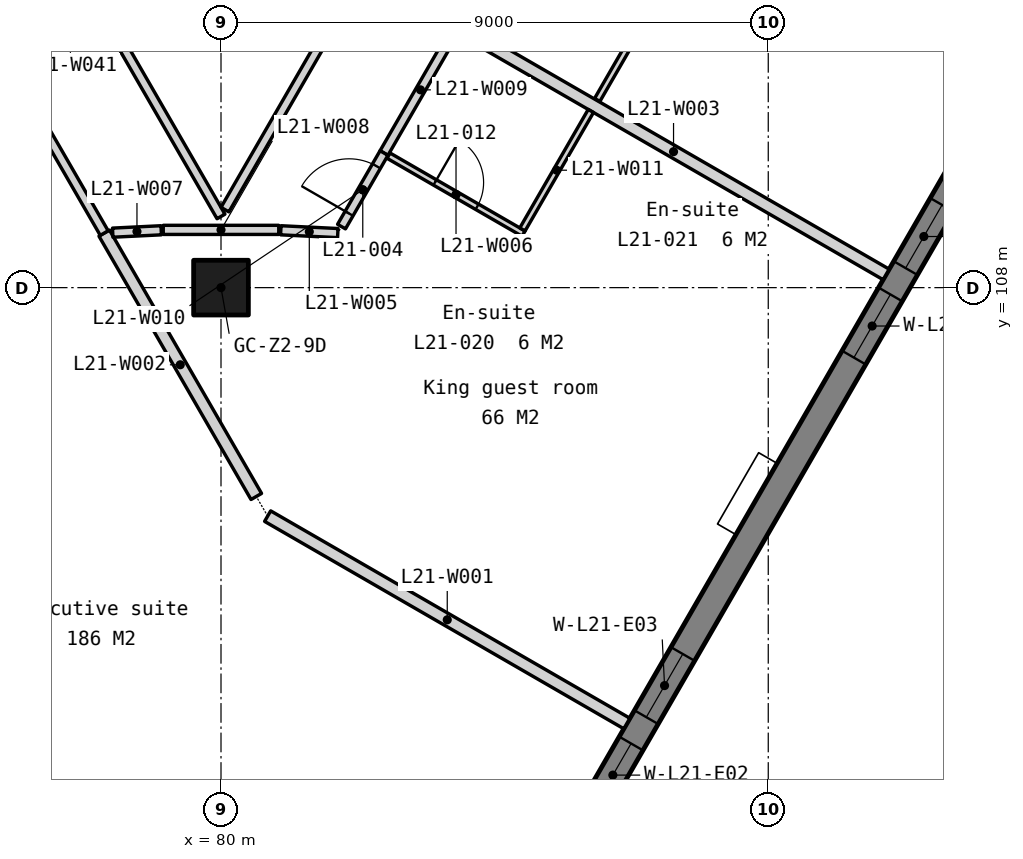
"""IFC4 building model, lengths in metres.
Left out: names, types, materials, properties, quantities, classifications, styles, units other than length and angle.
Written with IfcOpenShell. Run it as: python <this file> out.ifc"""

import sys

from ifc_helpers import new_model, si_unit, direction, frame, frame_2d, origin, origin_2d, place, context, subcontext, project, spatial, polyline, rectangle, outline, extrude, element, fill, save


model = new_model("IFC4")
c1 = context("Model", 3, precision=1e-05, world=origin(), true_north=direction((0.0, 1.0)))
c2 = subcontext(c1, "Body", "Model", "MODEL_VIEW")
j1 = project(units=[si_unit("LENGTHUNIT", "METRE"), si_unit("PLANEANGLEUNIT", "RADIAN")], contexts=[c1])
p1 = place(None, origin())
s1 = spatial("IfcSite", under=j1, at=p1, CompositionType="ELEMENT")
p2 = place(p1, origin())
s2 = spatial("IfcBuilding", under=s1, at=p2, CompositionType="ELEMENT")
p3 = place(p2, frame((0.0, 0.0, 88.8)))
s3 = spatial("IfcBuildingStorey", under=s2, at=p3, CompositionType="ELEMENT", Elevation=88.8)
p4 = place(p3, frame((80.0, 108.0, 0.0), z_axis=(0.0, 0.0, 1.0), x_axis=(1.0, 0.0, 0.0)))
e1 = element("IfcColumn", 1, at=p4, inside=s3, PredefinedType="COLUMN", context=c2, shape_type="SweptSolid", body=[
    extrude(rectangle(XDim=0.9, YDim=0.9, at=origin_2d()), origin(), (0.0, 0.0, 1.0), 3.5),
])
p5 = place(p3, frame((56.073, 130.263, -0.15), z_axis=(0.0, 0.0, 1.0), x_axis=(0.500000478905, -0.866025127289, 0.0)))
e2 = element("IfcWall", 2, at=p5, inside=s3, PredefinedType="SOLIDWALL", context=c2, shape_type="SweptSolid", body=[
    extrude(outline(polyline([(42.643, 0.0), (42.643, 3.5), (0.0, 3.5), (0.0, 0.0), (42.643, 0.0)])), frame((0.0, 0.225, 0.0), z_axis=(0.0, -1.0, 0.0), x_axis=(1.0, 0.0, 0.0)), (0.0, 0.0, 1.0), 0.45),
])
p6 = place(p5, frame((0.72, 0.0, 1.05)))
e3 = element("IfcOpeningElement", 3, at=p6, cuts=e2, PredefinedType="OPENING", context=c2, shape_type="SweptSolid", body=[
    extrude(rectangle(XDim=1.2, YDim=1.5, at=frame_2d((0.6, 0.75))), frame((0.0, 0.235, 0.0), z_axis=(0.0, -1.0, 0.0), x_axis=(1.0, 0.0, 0.0)), (0.0, 0.0, 1.0), 0.47),
])
p7 = place(p5, frame((7.079, 0.0, 1.05)))
e4 = element("IfcOpeningElement", 4, at=p7, cuts=e2, PredefinedType="OPENING", context=c2, shape_type="SweptSolid", body=[
    extrude(rectangle(XDim=1.2, YDim=1.5, at=frame_2d((0.6, 0.75))), frame((0.0, 0.235, 0.0), z_axis=(0.0, -1.0, 0.0), x_axis=(1.0, 0.0, 0.0)), (0.0, 0.0, 1.0), 0.47),
])
p8 = place(p5, frame((8.779, 0.0, 1.05)))
e5 = element("IfcOpeningElement", 5, at=p8, cuts=e2, PredefinedType="OPENING", context=c2, shape_type="SweptSolid", body=[
    extrude(rectangle(XDim=1.2, YDim=1.5, at=frame_2d((0.6, 0.75))), frame((0.0, 0.235, 0.0), z_axis=(0.0, -1.0, 0.0), x_axis=(1.0, 0.0, 0.0)), (0.0, 0.0, 1.0), 0.47),
])
p9 = place(p5, frame((15.607, 0.0, 1.05)))
e6 = element("IfcOpeningElement", 6, at=p9, cuts=e2, PredefinedType="OPENING", context=c2, shape_type="SweptSolid", body=[
    extrude(rectangle(XDim=1.2, YDim=1.5, at=frame_2d((0.6, 0.75))), frame((0.0, 0.235, 0.0), z_axis=(0.0, -1.0, 0.0), x_axis=(1.0, 0.0, 0.0)), (0.0, 0.0, 1.0), 0.47),
])
p10 = place(p5, frame((17.307, 0.0, 1.05)))
e7 = element("IfcOpeningElement", 7, at=p10, cuts=e2, PredefinedType="OPENING", context=c2, shape_type="SweptSolid", body=[
    extrude(rectangle(XDim=1.2, YDim=1.5, at=frame_2d((0.6, 0.75))), frame((0.0, 0.235, 0.0), z_axis=(0.0, -1.0, 0.0), x_axis=(1.0, 0.0, 0.0)), (0.0, 0.0, 1.0), 0.47),
])
p11 = place(p5, frame((24.136, 0.0, 1.05)))
e8 = element("IfcOpeningElement", 8, at=p11, cuts=e2, PredefinedType="OPENING", context=c2, shape_type="SweptSolid", body=[
    extrude(rectangle(XDim=1.2, YDim=1.5, at=frame_2d((0.6, 0.75))), frame((0.0, 0.235, 0.0), z_axis=(0.0, -1.0, 0.0), x_axis=(1.0, 0.0, 0.0)), (0.0, 0.0, 1.0), 0.47),
])
p12 = place(p5, frame((25.836, 0.0, 1.05)))
e9 = element("IfcOpeningElement", 9, at=p12, cuts=e2, PredefinedType="OPENING", context=c2, shape_type="SweptSolid", body=[
    extrude(rectangle(XDim=1.2, YDim=1.5, at=frame_2d((0.6, 0.75))), frame((0.0, 0.235, 0.0), z_axis=(0.0, -1.0, 0.0), x_axis=(1.0, 0.0, 0.0)), (0.0, 0.0, 1.0), 0.47),
])
p13 = place(p5, frame((32.665, 0.0, 1.05)))
e10 = element("IfcOpeningElement", 10, at=p13, cuts=e2, PredefinedType="OPENING", context=c2, shape_type="SweptSolid", body=[
    extrude(rectangle(XDim=1.2, YDim=1.5, at=frame_2d((0.6, 0.75))), frame((0.0, 0.235, 0.0), z_axis=(0.0, -1.0, 0.0), x_axis=(1.0, 0.0, 0.0)), (0.0, 0.0, 1.0), 0.47),
])
p14 = place(p5, frame((34.365, 0.0, 1.05)))
e11 = element("IfcOpeningElement", 11, at=p14, cuts=e2, PredefinedType="OPENING", context=c2, shape_type="SweptSolid", body=[
    extrude(rectangle(XDim=1.2, YDim=1.5, at=frame_2d((0.6, 0.75))), frame((0.0, 0.235, 0.0), z_axis=(0.0, -1.0, 0.0), x_axis=(1.0, 0.0, 0.0)), (0.0, 0.0, 1.0), 0.47),
])
p15 = place(p5, frame((40.722, 0.0, 1.05)))
e12 = element("IfcOpeningElement", 12, at=p15, cuts=e2, PredefinedType="OPENING", context=c2, shape_type="SweptSolid", body=[
    extrude(rectangle(XDim=1.2, YDim=1.5, at=frame_2d((0.6, 0.75))), frame((0.0, 0.235, 0.0), z_axis=(0.0, -1.0, 0.0), x_axis=(1.0, 0.0, 0.0)), (0.0, 0.0, 1.0), 0.47),
])
p16 = place(p3, frame((82.605, 93.333, -0.15), z_axis=(0.0, 0.0, 1.0), x_axis=(0.500000478905, 0.866025127289, 0.0)))
e13 = element("IfcWall", 13, at=p16, inside=s3, PredefinedType="SOLIDWALL", context=c2, shape_type="SweptSolid", body=[
    extrude(outline(polyline([(42.643, 0.0), (42.643, 3.5), (0.0, 3.5), (0.0, 0.0), (42.643, 0.0)])), frame((0.0, 0.225, 0.0), z_axis=(0.0, -1.0, 0.0), x_axis=(1.0, 0.0, 0.0)), (0.0, 0.0, 1.0), 0.45),
])
p17 = place(p16, frame((0.72, 0.0, 1.05)))
e14 = element("IfcOpeningElement", 14, at=p17, cuts=e13, PredefinedType="OPENING", context=c2, shape_type="SweptSolid", body=[
    extrude(rectangle(XDim=1.2, YDim=1.5, at=frame_2d((0.6, 0.75))), frame((0.0, 0.235, 0.0), z_axis=(0.0, -1.0, 0.0), x_axis=(1.0, 0.0, 0.0)), (0.0, 0.0, 1.0), 0.47),
])
p18 = place(p16, frame((7.079, 0.0, 1.05)))
e15 = element("IfcOpeningElement", 15, at=p18, cuts=e13, PredefinedType="OPENING", context=c2, shape_type="SweptSolid", body=[
    extrude(rectangle(XDim=1.2, YDim=1.5, at=frame_2d((0.6, 0.75))), frame((0.0, 0.235, 0.0), z_axis=(0.0, -1.0, 0.0), x_axis=(1.0, 0.0, 0.0)), (0.0, 0.0, 1.0), 0.47),
])
p19 = place(p16, frame((8.779, 0.0, 1.05)))
e16 = element("IfcOpeningElement", 16, at=p19, cuts=e13, PredefinedType="OPENING", context=c2, shape_type="SweptSolid", body=[
    extrude(rectangle(XDim=1.2, YDim=1.5, at=frame_2d((0.6, 0.75))), frame((0.0, 0.235, 0.0), z_axis=(0.0, -1.0, 0.0), x_axis=(1.0, 0.0, 0.0)), (0.0, 0.0, 1.0), 0.47),
])
p20 = place(p16, frame((15.607, 0.0, 1.05)))
e17 = element("IfcOpeningElement", 17, at=p20, cuts=e13, PredefinedType="OPENING", context=c2, shape_type="SweptSolid", body=[
    extrude(rectangle(XDim=1.2, YDim=1.5, at=frame_2d((0.6, 0.75))), frame((0.0, 0.235, 0.0), z_axis=(0.0, -1.0, 0.0), x_axis=(1.0, 0.0, 0.0)), (0.0, 0.0, 1.0), 0.47),
])
p21 = place(p16, frame((17.307, 0.0, 1.05)))
e18 = element("IfcOpeningElement", 18, at=p21, cuts=e13, PredefinedType="OPENING", context=c2, shape_type="SweptSolid", body=[
    extrude(rectangle(XDim=1.2, YDim=1.5, at=frame_2d((0.6, 0.75))), frame((0.0, 0.235, 0.0), z_axis=(0.0, -1.0, 0.0), x_axis=(1.0, 0.0, 0.0)), (0.0, 0.0, 1.0), 0.47),
])
p22 = place(p16, frame((24.136, 0.0, 1.05)))
e19 = element("IfcOpeningElement", 19, at=p22, cuts=e13, PredefinedType="OPENING", context=c2, shape_type="SweptSolid", body=[
    extrude(rectangle(XDim=1.2, YDim=1.5, at=frame_2d((0.6, 0.75))), frame((0.0, 0.235, 0.0), z_axis=(0.0, -1.0, 0.0), x_axis=(1.0, 0.0, 0.0)), (0.0, 0.0, 1.0), 0.47),
])
p23 = place(p16, frame((25.836, 0.0, 1.05)))
e20 = element("IfcOpeningElement", 20, at=p23, cuts=e13, PredefinedType="OPENING", context=c2, shape_type="SweptSolid", body=[
    extrude(rectangle(XDim=1.2, YDim=1.5, at=frame_2d((0.6, 0.75))), frame((0.0, 0.235, 0.0), z_axis=(0.0, -1.0, 0.0), x_axis=(1.0, 0.0, 0.0)), (0.0, 0.0, 1.0), 0.47),
])
p24 = place(p16, frame((32.665, 0.0, 1.05)))
e21 = element("IfcOpeningElement", 21, at=p24, cuts=e13, PredefinedType="OPENING", context=c2, shape_type="SweptSolid", body=[
    extrude(rectangle(XDim=1.2, YDim=1.5, at=frame_2d((0.6, 0.75))), frame((0.0, 0.235, 0.0), z_axis=(0.0, -1.0, 0.0), x_axis=(1.0, 0.0, 0.0)), (0.0, 0.0, 1.0), 0.47),
])
p25 = place(p16, frame((34.365, 0.0, 1.05)))
e22 = element("IfcOpeningElement", 22, at=p25, cuts=e13, PredefinedType="OPENING", context=c2, shape_type="SweptSolid", body=[
    extrude(rectangle(XDim=1.2, YDim=1.5, at=frame_2d((0.6, 0.75))), frame((0.0, 0.235, 0.0), z_axis=(0.0, -1.0, 0.0), x_axis=(1.0, 0.0, 0.0)), (0.0, 0.0, 1.0), 0.47),
])
p26 = place(p16, frame((40.722, 0.0, 1.05)))
e23 = element("IfcOpeningElement", 23, at=p26, cuts=e13, PredefinedType="OPENING", context=c2, shape_type="SweptSolid", body=[
    extrude(rectangle(XDim=1.2, YDim=1.5, at=frame_2d((0.6, 0.75))), frame((0.0, 0.235, 0.0), z_axis=(0.0, -1.0, 0.0), x_axis=(1.0, 0.0, 0.0)), (0.0, 0.0, 1.0), 0.47),
])
p27 = place(p3, frame((80.767, 104.242, 0.0), z_axis=(0.0, 0.0, 1.0), x_axis=(0.866027642648, -0.499996122155, 0.0)))
e24 = element("IfcWall", 24, at=p27, inside=s3, PredefinedType="PARTITIONING", context=c2, shape_type="SweptSolid", body=[
    extrude(rectangle(XDim=6.821, YDim=0.2, at=frame_2d((3.411, 0.0))), origin(), (0.0, 0.0, 1.0), 3.35),
])
p28 = place(p3, frame((78.079, 108.897, 0.0), z_axis=(0.0, 0.0, 1.0), x_axis=(0.499981580887, -0.866036037803, 0.0)))
e25 = element("IfcWall", 25, at=p28, inside=s3, PredefinedType="PARTITIONING", context=c2, shape_type="SweptSolid", body=[
    extrude(rectangle(XDim=5.002, YDim=0.2, at=frame_2d((2.501, 0.0))), origin(), (0.0, 0.0, 1.0), 3.35),
])
p29 = place(p3, frame((83.946, 112.255, 0.0), z_axis=(0.0, 0.0, 1.0), x_axis=(0.86603353517, -0.499985915763, 0.0)))
e26 = element("IfcWall", 26, at=p29, inside=s3, PredefinedType="PARTITIONING", context=c2, shape_type="SweptSolid", body=[
    extrude(rectangle(XDim=8.075, YDim=0.2, at=frame_2d((4.038, 0.0))), origin(), (0.0, 0.0, 1.0), 3.35),
])
p30 = place(p3, frame((73.987, 115.985, 0.0), z_axis=(0.0, 0.0, 1.0), x_axis=(0.499995293736, -0.86602812093, 0.0)))
e27 = element("IfcWall", 27, at=p30, inside=s3, PredefinedType="PARTITIONING", context=c2, shape_type="SweptSolid", body=[
    extrude(rectangle(XDim=8.185, YDim=0.15, at=frame_2d((4.092, 0.0))), origin(), (0.0, 0.0, 1.0), 3.35),
])
p31 = place(p30, frame((3.592, 0.0, 0.0)))
e28 = element("IfcOpeningElement", 28, at=p31, cuts=e27, PredefinedType="OPENING", context=c2, shape_type="SweptSolid", body=[
    extrude(rectangle(XDim=1.0, YDim=2.1, at=frame_2d((0.5, 1.05))), frame((0.0, 0.085, 0.0), z_axis=(0.0, -1.0, 0.0), x_axis=(1.0, 0.0, 0.0)), (0.0, 0.0, 1.0), 0.17),
])
p32 = place(p3, frame((80.983, 108.943, 0.0), z_axis=(0.0, 0.0, 1.0), x_axis=(0.998790324739, -0.049172016508, 0.0)))
e29 = element("IfcWall", 29, at=p32, inside=s3, PredefinedType="PARTITIONING", context=c2, shape_type="SweptSolid", body=[
    extrude(rectangle(XDim=0.938, YDim=0.15, at=frame_2d((0.469, 0.0))), origin(), (0.0, 0.0, 1.0), 3.35),
])
p33 = place(p3, frame((82.754, 110.171, 0.0), z_axis=(0.0, 0.0, 1.0), x_axis=(0.866038183914, -0.499977863513, 0.0)))
e30 = element("IfcWall", 30, at=p33, inside=s3, PredefinedType="PARTITIONING", context=c2, shape_type="SweptSolid", body=[
    extrude(rectangle(XDim=2.565, YDim=0.1, at=frame_2d((1.282, 0.0))), origin(), (0.0, 0.0, 1.0), 3.35),
])
p34 = place(p33, frame((0.883, 0.0, 0.0)))
e31 = element("IfcOpeningElement", 31, at=p34, cuts=e30, PredefinedType="OPENING", context=c2, shape_type="SweptSolid", body=[
    extrude(rectangle(XDim=0.8, YDim=2.1, at=frame_2d((0.4, 1.05))), frame((0.0, 0.06, 0.0), z_axis=(0.0, -1.0, 0.0), x_axis=(1.0, 0.0, 0.0)), (0.0, 0.0, 1.0), 0.12),
])
p35 = place(p3, frame((78.219, 108.904, 0.0), z_axis=(0.0, 0.0, 1.0), x_axis=(0.998787173297, 0.049235987416, 0.0)))
e32 = element("IfcWall", 32, at=p35, inside=s3, PredefinedType="PARTITIONING", context=c2, shape_type="SweptSolid", body=[
    extrude(rectangle(XDim=0.798, YDim=0.15, at=frame_2d((0.399, 0.0))), origin(), (0.0, 0.0, 1.0), 3.35),
])
p36 = place(p3, frame((79.05, 108.95, 0.0), z_axis=(0.0, 0.0, 1.0), x_axis=(1.0, 0.0, 0.0)))
e33 = element("IfcWall", 33, at=p36, inside=s3, PredefinedType="PARTITIONING", context=c2, shape_type="SweptSolid", body=[
    extrude(rectangle(XDim=1.9, YDim=0.15, at=frame_2d((0.95, 0.0))), origin(), (0.0, 0.0, 1.0), 3.35),
])
p37 = place(p3, frame((82.681, 110.214, 0.0), z_axis=(0.0, 0.0, 1.0), x_axis=(0.500001309137, 0.866024647952, 0.0)))
e34 = element("IfcWall", 34, at=p37, inside=s3, PredefinedType="PARTITIONING", context=c2, shape_type="SweptSolid", body=[
    extrude(rectangle(XDim=2.4, YDim=0.15, at=frame_2d((1.2, 0.0))), origin(), (0.0, 0.0, 1.0), 3.35),
])
p38 = place(p3, frame((81.982, 109.004, 0.0), z_axis=(0.0, 0.0, 1.0), x_axis=(0.500009789943, 0.866019751484, 0.0)))
e35 = element("IfcWall", 35, at=p38, inside=s3, PredefinedType="PARTITIONING", context=c2, shape_type="SweptSolid", body=[
    extrude(rectangle(XDim=1.397, YDim=0.15, at=frame_2d((0.699, 0.0))), origin(), (0.0, 0.0, 1.0), 3.35),
])
p39 = place(p38, frame((0.249, 0.0, 0.0)))
e36 = element("IfcOpeningElement", 36, at=p39, cuts=e35, PredefinedType="OPENING", context=c2, shape_type="SweptSolid", body=[
    extrude(rectangle(XDim=0.9, YDim=2.1, at=frame_2d((0.45, 1.05))), frame((0.0, 0.085, 0.0), z_axis=(0.0, -1.0, 0.0), x_axis=(1.0, 0.0, 0.0)), (0.0, 0.0, 1.0), 0.17),
])
p40 = place(p3, frame((84.958, 108.957, 0.0), z_axis=(0.0, 0.0, 1.0), x_axis=(0.499966648284, 0.866044658551, 0.0)))
e37 = element("IfcWall", 37, at=p40, inside=s3, PredefinedType="PARTITIONING", context=c2, shape_type="SweptSolid", body=[
    extrude(rectangle(XDim=2.25, YDim=0.1, at=frame_2d((1.125, 0.0))), origin(), (0.0, 0.0, 1.0), 3.35),
])
p41 = place(p3, frame((86.087, 115.943, 0.0), z_axis=(0.0, 0.0, 1.0), x_axis=(0.866010152247, -0.500026415507, 0.0)))
e38 = element("IfcWall", 38, at=p41, inside=s3, PredefinedType="PARTITIONING", context=c2, shape_type="SweptSolid", body=[
    extrude(rectangle(XDim=8.065, YDim=0.2, at=frame_2d((4.032, 0.0))), origin(), (0.0, 0.0, 1.0), 3.35),
])
p42 = place(p3, frame((86.188, 111.088, 0.0), z_axis=(0.0, 0.0, 1.0), x_axis=(0.499999433879, 0.866025730634, 0.0)))
e39 = element("IfcWall", 39, at=p42, inside=s3, PredefinedType="PARTITIONING", context=c2, shape_type="SweptSolid", body=[
    extrude(rectangle(XDim=2.34, YDim=0.1, at=frame_2d((1.17, 0.0))), origin(), (0.0, 0.0, 1.0), 3.35),
])
p43 = place(p3, frame((75.047, 117.75, 0.0), z_axis=(0.0, 0.0, 1.0), x_axis=(0.499995505729, -0.866027998537, 0.0)))
e40 = element("IfcWall", 40, at=p43, inside=s3, PredefinedType="PARTITIONING", context=c2, shape_type="SweptSolid", body=[
    extrude(rectangle(XDim=9.907, YDim=0.15, at=frame_2d((4.953, 0.0))), origin(), (0.0, 0.0, 1.0), 3.35),
])
p44 = place(p43, frame((4.053, 0.0, 0.0)))
e41 = element("IfcOpeningElement", 41, at=p44, cuts=e40, PredefinedType="OPENING", context=c2, shape_type="SweptSolid", body=[
    extrude(rectangle(XDim=1.8, YDim=2.1, at=frame_2d((0.9, 1.05))), frame((0.0, 0.085, 0.0), z_axis=(0.0, -1.0, 0.0), x_axis=(1.0, 0.0, 0.0)), (0.0, 0.0, 1.0), 0.17),
])
p45 = place(p3, frame((80.065, 109.283, 0.0), z_axis=(0.0, 0.0, 1.0), x_axis=(0.49999841397, 0.866026319477, 0.0)))
e42 = element("IfcWall", 42, at=p45, inside=s3, PredefinedType="PARTITIONING", context=c2, shape_type="SweptSolid", body=[
    extrude(rectangle(XDim=9.777, YDim=0.15, at=frame_2d((4.888, 0.0))), origin(), (0.0, 0.0, 1.0), 3.35),
])
p46 = place(p18, origin())
e43 = element("IfcWindow", 43, at=p46, inside=s3, PartitioningType="SINGLE_PANEL", PredefinedType="WINDOW", context=c2, shape_type="SweptSolid", body=[
    extrude(rectangle(XDim=1.2, YDim=1.5, at=frame_2d((0.6, 0.75))), frame((0.0, 0.03, 0.0), z_axis=(0.0, -1.0, 0.0), x_axis=(1.0, 0.0, 0.0)), (0.0, 0.0, 1.0), 0.06),
])
fill(e15, e43)
p47 = place(p19, origin())
e44 = element("IfcWindow", 44, at=p47, inside=s3, PartitioningType="SINGLE_PANEL", PredefinedType="WINDOW", context=c2, shape_type="SweptSolid", body=[
    extrude(rectangle(XDim=1.2, YDim=1.5, at=frame_2d((0.6, 0.75))), frame((0.0, 0.03, 0.0), z_axis=(0.0, -1.0, 0.0), x_axis=(1.0, 0.0, 0.0)), (0.0, 0.0, 1.0), 0.06),
])
fill(e16, e44)
p48 = place(p20, origin())
e45 = element("IfcWindow", 45, at=p48, inside=s3, PartitioningType="SINGLE_PANEL", PredefinedType="WINDOW", context=c2, shape_type="SweptSolid", body=[
    extrude(rectangle(XDim=1.2, YDim=1.5, at=frame_2d((0.6, 0.75))), frame((0.0, 0.03, 0.0), z_axis=(0.0, -1.0, 0.0), x_axis=(1.0, 0.0, 0.0)), (0.0, 0.0, 1.0), 0.06),
])
fill(e17, e45)
p49 = place(p21, origin())
e46 = element("IfcWindow", 46, at=p49, inside=s3, PartitioningType="SINGLE_PANEL", PredefinedType="WINDOW", context=c2, shape_type="SweptSolid", body=[
    extrude(rectangle(XDim=1.2, YDim=1.5, at=frame_2d((0.6, 0.75))), frame((0.0, 0.03, 0.0), z_axis=(0.0, -1.0, 0.0), x_axis=(1.0, 0.0, 0.0)), (0.0, 0.0, 1.0), 0.06),
])
fill(e18, e46)
p50 = place(p39, origin())
e47 = element("IfcDoor", 47, at=p50, inside=s3, OperationType="SINGLE_SWING_LEFT", PredefinedType="DOOR", context=c2, shape_type="SweptSolid", body=[
    extrude(rectangle(XDim=0.9, YDim=2.1, at=frame_2d((0.45, 1.05))), frame((0.0, 0.025, 0.0), z_axis=(0.0, -1.0, 0.0), x_axis=(1.0, 0.0, 0.0)), (0.0, 0.0, 1.0), 0.05),
])
fill(e36, e47)
p51 = place(p34, origin())
e48 = element("IfcDoor", 48, at=p51, inside=s3, OperationType="SINGLE_SWING_LEFT", PredefinedType="DOOR", context=c2, shape_type="SweptSolid", body=[
    extrude(rectangle(XDim=0.8, YDim=2.1, at=frame_2d((0.4, 1.05))), frame((0.0, 0.025, 0.0), z_axis=(0.0, -1.0, 0.0), x_axis=(1.0, 0.0, 0.0)), (0.0, 0.0, 1.0), 0.05),
])
fill(e31, e48)
save(model, sys.argv[1])
